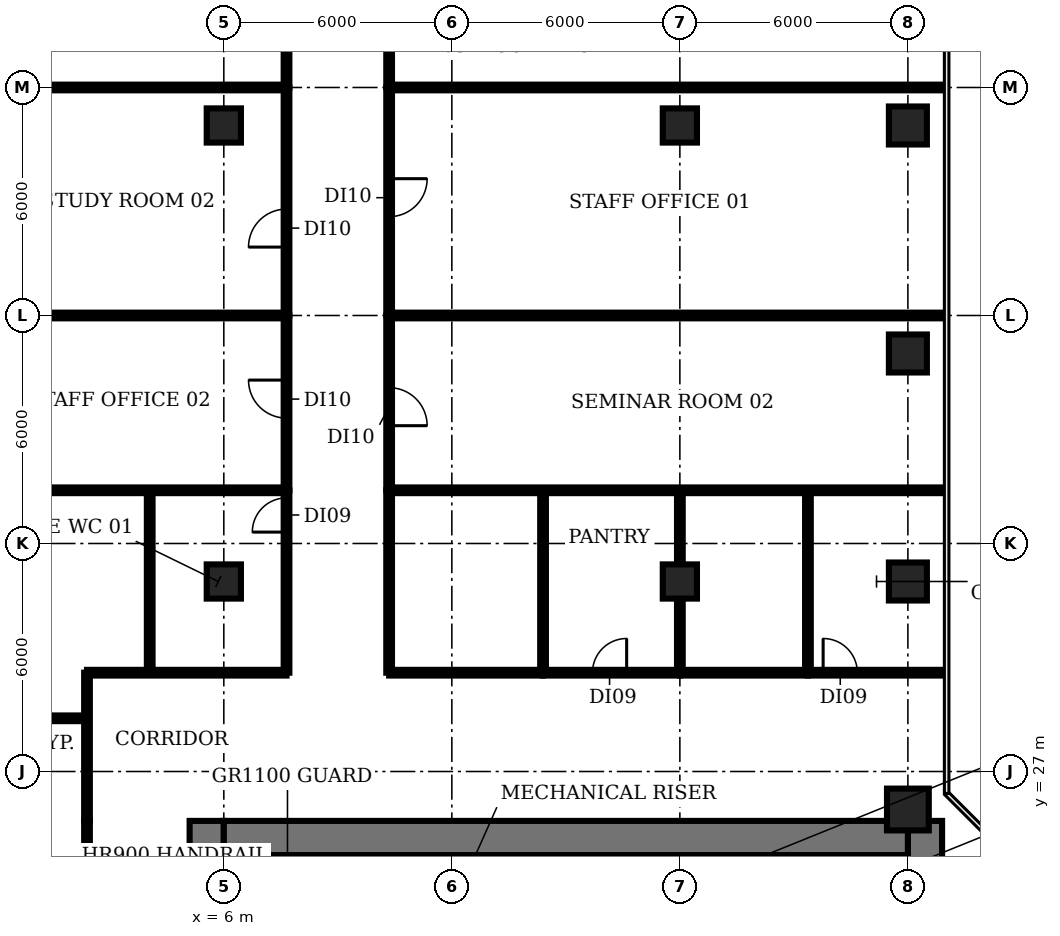
"""IFC4 building model, lengths in metres.
Left out: names, types, materials, properties, quantities, classifications, styles, units other than length and angle.
Written with IfcOpenShell. Run it as: python <this file> out.ifc"""

import sys

from ifc_helpers import new_model, si_unit, direction, frame, frame_2d, origin, origin_2d, place, context, subcontext, project, spatial, rectangle, circle, extrude, element, fill, save


model = new_model("IFC4")
c1 = context("Model", 3, precision=1e-05, world=origin(), true_north=direction((0.0, 1.0)))
c2 = subcontext(c1, "Body", "Model", "MODEL_VIEW")
j1 = project(units=[si_unit("LENGTHUNIT", "METRE"), si_unit("PLANEANGLEUNIT", "RADIAN")], contexts=[c1])
p1 = place(None, origin())
s1 = spatial("IfcSite", under=j1, at=p1, CompositionType="ELEMENT")
p2 = place(p1, origin())
s2 = spatial("IfcBuilding", under=s1, at=p2, CompositionType="ELEMENT")
p3 = place(p2, frame((0.0, 0.0, 11.0)))
s3 = spatial("IfcBuildingStorey", under=s2, at=p3, CompositionType="ELEMENT", Elevation=11.0)
for number, where, z_axis, x_axis in (
    (1, (6.0, 32.0, 0.0), (0.0, 0.0, 1.0), (1.0, 0.0, 0.0)),
    (2, (6.0, 44.0, 0.0), (0.0, 0.0, 1.0), (1.0, 0.0, 0.0)),
    (3, (18.0, 32.0, 0.0), (0.0, 0.0, 1.0), (1.0, 0.0, 0.0)),
    (4, (18.0, 44.0, 0.0), (0.0, 0.0, 1.0), (1.0, 0.0, 0.0)),
):
    element("IfcColumn", number, at=place(p3, frame(where, z_axis=z_axis, x_axis=x_axis)), inside=s3, PredefinedType="COLUMN", context=c2, shape_type="SweptSolid", body=[
        extrude(rectangle(XDim=0.9, YDim=0.9, at=origin_2d()), origin(), (0.0, 0.0, 1.0), 4.15),
    ])
p4 = place(p3, frame((24.0, 26.0, 0.0), z_axis=(0.0, 0.0, 1.0), x_axis=(1.0, 0.0, 0.0)))
e5 = element("IfcColumn", 5, at=p4, inside=s3, PredefinedType="COLUMN", context=c2, shape_type="SweptSolid", body=[
    extrude(circle(Radius=0.55, at=origin_2d()), origin(), (0.0, 0.0, 1.0), 4.15),
])
for number, where, z_axis, x_axis in (
    (6, (24.0, 32.0, 0.0), (0.0, 0.0, 1.0), (1.0, 0.0, 0.0)),
    (7, (24.0, 38.0, 0.0), (0.0, 0.0, 1.0), (1.0, 0.0, 0.0)),
    (8, (24.0, 44.0, 0.0), (0.0, 0.0, 1.0), (1.0, 0.0, 0.0)),
):
    element("IfcColumn", number, at=place(p3, frame(where, z_axis=z_axis, x_axis=x_axis)), inside=s3, PredefinedType="COLUMN", context=c2, shape_type="SweptSolid", body=[
        extrude(rectangle(XDim=1.0, YDim=1.0, at=origin_2d()), origin(), (0.0, 0.0, 1.0), 4.15),
    ])
p5 = place(p3, frame((9.275, 18.375, 0.0), z_axis=(0.0, 0.0, 1.0), x_axis=(0.0, 1.0, 0.0)))
e9 = element("IfcWall", 9, at=p5, inside=s3, PredefinedType="SHEAR", context=c2, shape_type="SweptSolid", body=[
    extrude(rectangle(XDim=6.425, YDim=0.25, at=frame_2d((3.212, 0.0))), origin(), (0.0, 0.0, 1.0), 4.15),
])
for number, where, z_axis, x_axis in (
    (10, (15.1, 22.9, 0.0), (0.0, 0.0, 1.0), (0.0, 1.0, 0.0)),
    (11, (20.7, 22.9, 0.0), (0.0, 0.0, 1.0), (0.0, 1.0, 0.0)),
):
    element("IfcWall", number, at=place(p3, frame(where, z_axis=z_axis, x_axis=x_axis)), inside=s3, PredefinedType="SHEAR", context=c2, shape_type="SweptSolid", body=[
        extrude(rectangle(XDim=1.9, YDim=0.2, at=frame_2d((0.95, 0.0))), origin(), (0.0, 0.0, 1.0), 4.15),
    ])
p6 = place(p3, frame((5.55, 4.5, 0.0), z_axis=(0.0, 0.0, 1.0), x_axis=(0.0, 1.0, 0.0)))
e12 = element("IfcWall", 12, at=p6, inside=s3, PredefinedType="SHEAR", context=c2, shape_type="SweptSolid", body=[
    extrude(rectangle(XDim=21.2, YDim=0.9, at=frame_2d((10.6, 0.0))), origin(), (0.0, 0.0, 1.0), 4.15),
])
p7 = place(p6, frame((7.6, 0.0, 0.0)))
e13 = element("IfcOpeningElement", 13, at=p7, cuts=e12, PredefinedType="OPENING", context=c2, shape_type="SweptSolid", body=[
    extrude(rectangle(XDim=1.2, YDim=2.1, at=frame_2d((0.6, 1.05))), frame((0.0, 0.46, 0.0), z_axis=(0.0, -1.0, 0.0), x_axis=(1.0, 0.0, 0.0)), (0.0, 0.0, 1.0), 0.92),
])
p8 = place(p6, frame((14.15, 0.0, 0.0)))
e14 = element("IfcOpeningElement", 14, at=p8, cuts=e12, PredefinedType="OPENING", context=c2, shape_type="SweptSolid", body=[
    extrude(rectangle(XDim=1.2, YDim=2.1, at=frame_2d((0.6, 1.05))), frame((0.0, 0.46, 0.0), z_axis=(0.0, -1.0, 0.0), x_axis=(1.0, 0.0, 0.0)), (0.0, 0.0, 1.0), 0.92),
])
p9 = place(p3, frame((24.45, 25.7, 0.0), z_axis=(0.0, 0.0, 1.0), x_axis=(0.0, -1.0, 0.0)))
e15 = element("IfcWall", 15, at=p9, inside=s3, PredefinedType="SHEAR", context=c2, shape_type="SweptSolid", body=[
    extrude(rectangle(XDim=21.2, YDim=0.9, at=frame_2d((10.6, 0.0))), origin(), (0.0, 0.0, 1.0), 4.15),
])
p10 = place(p9, frame((12.45, 0.0, 0.0)))
e16 = element("IfcOpeningElement", 16, at=p10, cuts=e15, PredefinedType="OPENING", context=c2, shape_type="SweptSolid", body=[
    extrude(rectangle(XDim=0.9, YDim=2.1, at=frame_2d((0.45, 1.05))), frame((0.0, 0.46, 0.0), z_axis=(0.0, -1.0, 0.0), x_axis=(1.0, 0.0, 0.0)), (0.0, 0.0, 1.0), 0.92),
])
p11 = place(p9, frame((6.45, 0.0, 0.0)))
e17 = element("IfcOpeningElement", 17, at=p11, cuts=e15, PredefinedType="OPENING", context=c2, shape_type="SweptSolid", body=[
    extrude(rectangle(XDim=2.0, YDim=2.1, at=frame_2d((1.0, 1.05))), frame((0.0, 0.46, 0.0), z_axis=(0.0, -1.0, 0.0), x_axis=(1.0, 0.0, 0.0)), (0.0, 0.0, 1.0), 0.92),
])
p12 = place(p3, frame((6.0, 25.25, 0.0), z_axis=(0.0, 0.0, 1.0), x_axis=(1.0, 0.0, 0.0)))
e18 = element("IfcWall", 18, at=p12, inside=s3, PredefinedType="SHEAR", context=c2, shape_type="SweptSolid", body=[
    extrude(rectangle(XDim=18.0, YDim=0.9, at=frame_2d((9.0, 0.0))), origin(), (0.0, 0.0, 1.0), 4.15),
])
p13 = place(p3, frame((-0.97, 28.4, 0.0), z_axis=(0.0, 0.0, 1.0), x_axis=(1.0, 0.0, 0.0)))
e19 = element("IfcWall", 19, at=p13, inside=s3, PredefinedType="PARTITIONING", context=c2, shape_type="SweptSolid", body=[
    extrude(rectangle(XDim=3.37, YDim=0.15, at=frame_2d((1.685, 0.0))), origin(), (0.0, 0.0, 1.0), 3.08),
])
for number, where, z_axis, x_axis in (
    (20, (-0.97, 34.4, 0.0), (0.0, 0.0, 1.0), (1.0, 0.0, 0.0)),
    (21, (-0.97, 39.0, 0.0), (0.0, 0.0, 1.0), (1.0, 0.0, 0.0)),
    (22, (-0.97, 45.0, 0.0), (0.0, 0.0, 1.0), (1.0, 0.0, 0.0)),
):
    element("IfcWall", number, at=place(p3, frame(where, z_axis=z_axis, x_axis=x_axis)), inside=s3, PredefinedType="PARTITIONING", context=c2, shape_type="SweptSolid", body=[
        extrude(rectangle(XDim=8.62, YDim=0.15, at=frame_2d((4.31, 0.0))), origin(), (0.0, 0.0, 1.0), 3.08),
    ])
p14 = place(p3, frame((2.4, 4.5, 0.0), z_axis=(0.0, 0.0, 1.0), x_axis=(0.0, 1.0, 0.0)))
e23 = element("IfcWall", 23, at=p14, inside=s3, PredefinedType="PARTITIONING", context=c2, shape_type="SweptSolid", body=[
    extrude(rectangle(XDim=21.2, YDim=0.15, at=frame_2d((10.6, 0.0))), origin(), (0.0, 0.0, 1.0), 3.08),
])
p15 = place(p14, frame((10.8, 0.0, 0.0)))
e24 = element("IfcOpeningElement", 24, at=p15, cuts=e23, PredefinedType="OPENING", context=c2, shape_type="SweptSolid", body=[
    extrude(rectangle(XDim=1.2, YDim=2.1, at=frame_2d((0.6, 1.05))), frame((0.0, 0.085, 0.0), z_axis=(0.0, -1.0, 0.0), x_axis=(1.0, 0.0, 0.0)), (0.0, 0.0, 1.0), 0.17),
])
p16 = place(p3, frame((2.4, 25.7, 0.0), z_axis=(0.0, 0.0, 1.0), x_axis=(0.0, 1.0, 0.0)))
e25 = element("IfcWall", 25, at=p16, inside=s3, PredefinedType="PARTITIONING", context=c2, shape_type="SweptSolid", body=[
    extrude(rectangle(XDim=3.9, YDim=0.15, at=frame_2d((1.95, 0.0))), origin(), (0.0, 0.0, 1.0), 3.08),
])
p17 = place(p3, frame((2.4, 29.6, 0.0), z_axis=(0.0, 0.0, 1.0), x_axis=(1.0, 0.0, 0.0)))
e26 = element("IfcWall", 26, at=p17, inside=s3, PredefinedType="PARTITIONING", context=c2, shape_type="SweptSolid", body=[
    extrude(rectangle(XDim=5.25, YDim=0.15, at=frame_2d((2.625, 0.0))), origin(), (0.0, 0.0, 1.0), 3.08),
])
p18 = place(p3, frame((4.05, 29.6, 0.0), z_axis=(0.0, 0.0, 1.0), x_axis=(0.0, 1.0, 0.0)))
e27 = element("IfcWall", 27, at=p18, inside=s3, PredefinedType="PARTITIONING", context=c2, shape_type="SweptSolid", body=[
    extrude(rectangle(XDim=4.8, YDim=0.15, at=frame_2d((2.4, 0.0))), origin(), (0.0, 0.0, 1.0), 3.08),
])
p19 = place(p3, frame((7.65, 29.6, 0.0), z_axis=(0.0, 0.0, 1.0), x_axis=(0.0, 1.0, 0.0)))
e28 = element("IfcWall", 28, at=p19, inside=s3, PredefinedType="PARTITIONING", context=c2, shape_type="SweptSolid", body=[
    extrude(rectangle(XDim=4.8, YDim=0.15, at=frame_2d((2.4, 0.0))), origin(), (0.0, 0.0, 1.0), 3.08),
])
p20 = place(p19, frame((3.7, 0.0, 0.0)))
e29 = element("IfcOpeningElement", 29, at=p20, cuts=e28, PredefinedType="OPENING", context=c2, shape_type="SweptSolid", body=[
    extrude(rectangle(XDim=0.9, YDim=2.1, at=frame_2d((0.45, 1.05))), frame((0.0, 0.085, 0.0), z_axis=(0.0, -1.0, 0.0), x_axis=(1.0, 0.0, 0.0)), (0.0, 0.0, 1.0), 0.17),
])
p21 = place(p3, frame((7.65, 34.4, 0.0), z_axis=(0.0, 0.0, 1.0), x_axis=(0.0, 1.0, 0.0)))
e30 = element("IfcWall", 30, at=p21, inside=s3, PredefinedType="PARTITIONING", context=c2, shape_type="SweptSolid", body=[
    extrude(rectangle(XDim=4.6, YDim=0.15, at=frame_2d((2.3, 0.0))), origin(), (0.0, 0.0, 1.0), 3.08),
])
p22 = place(p21, frame((1.9, 0.0, 0.0)))
e31 = element("IfcOpeningElement", 31, at=p22, cuts=e30, PredefinedType="OPENING", context=c2, shape_type="SweptSolid", body=[
    extrude(rectangle(XDim=1.0, YDim=2.1, at=frame_2d((0.5, 1.05))), frame((0.0, 0.085, 0.0), z_axis=(0.0, -1.0, 0.0), x_axis=(1.0, 0.0, 0.0)), (0.0, 0.0, 1.0), 0.17),
])
p23 = place(p3, frame((7.65, 39.0, 0.0), z_axis=(0.0, 0.0, 1.0), x_axis=(0.0, 1.0, 0.0)))
e32 = element("IfcWall", 32, at=p23, inside=s3, PredefinedType="PARTITIONING", context=c2, shape_type="SweptSolid", body=[
    extrude(rectangle(XDim=6.0, YDim=0.15, at=frame_2d((3.0, 0.0))), origin(), (0.0, 0.0, 1.0), 3.08),
])
p24 = place(p23, frame((1.8, 0.0, 0.0)))
e33 = element("IfcOpeningElement", 33, at=p24, cuts=e32, PredefinedType="OPENING", context=c2, shape_type="SweptSolid", body=[
    extrude(rectangle(XDim=1.0, YDim=2.1, at=frame_2d((0.5, 1.05))), frame((0.0, 0.085, 0.0), z_axis=(0.0, -1.0, 0.0), x_axis=(1.0, 0.0, 0.0)), (0.0, 0.0, 1.0), 0.17),
])
p25 = place(p3, frame((7.65, 45.0, 0.0), z_axis=(0.0, 0.0, 1.0), x_axis=(0.0, 1.0, 0.0)))
e34 = element("IfcWall", 34, at=p25, inside=s3, PredefinedType="PARTITIONING", context=c2, shape_type="SweptSolid", body=[
    extrude(rectangle(XDim=12.0, YDim=0.15, at=frame_2d((6.0, 0.0))), origin(), (0.0, 0.0, 1.0), 3.08),
])
p26 = place(p25, frame((5.4, 0.0, 0.0)))
e35 = element("IfcOpeningElement", 35, at=p26, cuts=e34, PredefinedType="OPENING", context=c2, shape_type="SweptSolid", body=[
    extrude(rectangle(XDim=1.0, YDim=2.1, at=frame_2d((0.5, 1.05))), frame((0.0, 0.085, 0.0), z_axis=(0.0, -1.0, 0.0), x_axis=(1.0, 0.0, 0.0)), (0.0, 0.0, 1.0), 0.17),
])
p27 = place(p3, frame((10.35, 29.6, 0.0), z_axis=(0.0, 0.0, 1.0), x_axis=(0.0, 1.0, 0.0)))
e36 = element("IfcWall", 36, at=p27, inside=s3, PredefinedType="PARTITIONING", context=c2, shape_type="SweptSolid", body=[
    extrude(rectangle(XDim=4.8, YDim=0.15, at=frame_2d((2.4, 0.0))), origin(), (0.0, 0.0, 1.0), 3.08),
])
p28 = place(p3, frame((10.35, 29.6, 0.0), z_axis=(0.0, 0.0, 1.0), x_axis=(1.0, 0.0, 0.0)))
e37 = element("IfcWall", 37, at=p28, inside=s3, PredefinedType="PARTITIONING", context=c2, shape_type="SweptSolid", body=[
    extrude(rectangle(XDim=4.05, YDim=0.15, at=frame_2d((2.025, 0.0))), origin(), (0.0, 0.0, 1.0), 3.08),
])
p29 = place(p3, frame((10.35, 34.4, 0.0), z_axis=(0.0, 0.0, 1.0), x_axis=(1.0, 0.0, 0.0)))
e38 = element("IfcWall", 38, at=p29, inside=s3, PredefinedType="PARTITIONING", context=c2, shape_type="SweptSolid", body=[
    extrude(rectangle(XDim=14.62, YDim=0.15, at=frame_2d((7.31, 0.0))), origin(), (0.0, 0.0, 1.0), 3.08),
])
p30 = place(p3, frame((10.35, 39.0, 0.0), z_axis=(0.0, 0.0, 1.0), x_axis=(0.0, -1.0, 0.0)))
e39 = element("IfcWall", 39, at=p30, inside=s3, PredefinedType="PARTITIONING", context=c2, shape_type="SweptSolid", body=[
    extrude(rectangle(XDim=4.6, YDim=0.15, at=frame_2d((2.3, 0.0))), origin(), (0.0, 0.0, 1.0), 3.08),
])
p31 = place(p30, frame((1.9, 0.0, 0.0)))
e40 = element("IfcOpeningElement", 40, at=p31, cuts=e39, PredefinedType="OPENING", context=c2, shape_type="SweptSolid", body=[
    extrude(rectangle(XDim=1.0, YDim=2.1, at=frame_2d((0.5, 1.05))), frame((0.0, 0.085, 0.0), z_axis=(0.0, -1.0, 0.0), x_axis=(1.0, 0.0, 0.0)), (0.0, 0.0, 1.0), 0.17),
])
p32 = place(p3, frame((10.35, 39.0, 0.0), z_axis=(0.0, 0.0, 1.0), x_axis=(1.0, 0.0, 0.0)))
e41 = element("IfcWall", 41, at=p32, inside=s3, PredefinedType="PARTITIONING", context=c2, shape_type="SweptSolid", body=[
    extrude(rectangle(XDim=14.62, YDim=0.15, at=frame_2d((7.31, 0.0))), origin(), (0.0, 0.0, 1.0), 3.08),
])
p33 = place(p3, frame((10.35, 45.0, 0.0), z_axis=(0.0, 0.0, 1.0), x_axis=(0.0, -1.0, 0.0)))
e42 = element("IfcWall", 42, at=p33, inside=s3, PredefinedType="PARTITIONING", context=c2, shape_type="SweptSolid", body=[
    extrude(rectangle(XDim=6.0, YDim=0.15, at=frame_2d((3.0, 0.0))), origin(), (0.0, 0.0, 1.0), 3.08),
])
p34 = place(p33, frame((2.4, 0.0, 0.0)))
e43 = element("IfcOpeningElement", 43, at=p34, cuts=e42, PredefinedType="OPENING", context=c2, shape_type="SweptSolid", body=[
    extrude(rectangle(XDim=1.0, YDim=2.1, at=frame_2d((0.5, 1.05))), frame((0.0, 0.085, 0.0), z_axis=(0.0, -1.0, 0.0), x_axis=(1.0, 0.0, 0.0)), (0.0, 0.0, 1.0), 0.17),
])
p35 = place(p3, frame((10.35, 45.0, 0.0), z_axis=(0.0, 0.0, 1.0), x_axis=(1.0, 0.0, 0.0)))
e44 = element("IfcWall", 44, at=p35, inside=s3, PredefinedType="PARTITIONING", context=c2, shape_type="SweptSolid", body=[
    extrude(rectangle(XDim=14.62, YDim=0.15, at=frame_2d((7.31, 0.0))), origin(), (0.0, 0.0, 1.0), 3.08),
])
p36 = place(p3, frame((10.35, 57.0, 0.0), z_axis=(0.0, 0.0, 1.0), x_axis=(0.0, -1.0, 0.0)))
e45 = element("IfcWall", 45, at=p36, inside=s3, PredefinedType="PARTITIONING", context=c2, shape_type="SweptSolid", body=[
    extrude(rectangle(XDim=12.0, YDim=0.15, at=frame_2d((6.0, 0.0))), origin(), (0.0, 0.0, 1.0), 3.08),
])
p37 = place(p36, frame((5.4, 0.0, 0.0)))
e46 = element("IfcOpeningElement", 46, at=p37, cuts=e45, PredefinedType="OPENING", context=c2, shape_type="SweptSolid", body=[
    extrude(rectangle(XDim=1.0, YDim=2.1, at=frame_2d((0.5, 1.05))), frame((0.0, 0.085, 0.0), z_axis=(0.0, -1.0, 0.0), x_axis=(1.0, 0.0, 0.0)), (0.0, 0.0, 1.0), 0.17),
])
p38 = place(p3, frame((14.4, 29.6, 0.0), z_axis=(0.0, 0.0, 1.0), x_axis=(0.0, 1.0, 0.0)))
e47 = element("IfcWall", 47, at=p38, inside=s3, PredefinedType="PARTITIONING", context=c2, shape_type="SweptSolid", body=[
    extrude(rectangle(XDim=4.8, YDim=0.15, at=frame_2d((2.4, 0.0))), origin(), (0.0, 0.0, 1.0), 3.08),
])
p39 = place(p3, frame((14.4, 29.6, 0.0), z_axis=(0.0, 0.0, 1.0), x_axis=(1.0, 0.0, 0.0)))
e48 = element("IfcWall", 48, at=p39, inside=s3, PredefinedType="PARTITIONING", context=c2, shape_type="SweptSolid", body=[
    extrude(rectangle(XDim=3.6, YDim=0.15, at=frame_2d((1.8, 0.0))), origin(), (0.0, 0.0, 1.0), 3.08),
])
p40 = place(p39, frame((1.3, 0.0, 0.0)))
e49 = element("IfcOpeningElement", 49, at=p40, cuts=e48, PredefinedType="OPENING", context=c2, shape_type="SweptSolid", body=[
    extrude(rectangle(XDim=0.9, YDim=2.1, at=frame_2d((0.45, 1.05))), frame((0.0, 0.085, 0.0), z_axis=(0.0, -1.0, 0.0), x_axis=(1.0, 0.0, 0.0)), (0.0, 0.0, 1.0), 0.17),
])
p41 = place(p3, frame((18.0, 29.6, 0.0), z_axis=(0.0, 0.0, 1.0), x_axis=(0.0, 1.0, 0.0)))
e50 = element("IfcWall", 50, at=p41, inside=s3, PredefinedType="PARTITIONING", context=c2, shape_type="SweptSolid", body=[
    extrude(rectangle(XDim=4.8, YDim=0.15, at=frame_2d((2.4, 0.0))), origin(), (0.0, 0.0, 1.0), 3.08),
])
p42 = place(p3, frame((18.0, 29.6, 0.0), z_axis=(0.0, 0.0, 1.0), x_axis=(1.0, 0.0, 0.0)))
e51 = element("IfcWall", 51, at=p42, inside=s3, PredefinedType="PARTITIONING", context=c2, shape_type="SweptSolid", body=[
    extrude(rectangle(XDim=3.37, YDim=0.15, at=frame_2d((1.685, 0.0))), origin(), (0.0, 0.0, 1.0), 3.08),
])
p43 = place(p3, frame((21.37, 29.6, 0.0), z_axis=(0.0, 0.0, 1.0), x_axis=(0.0, 1.0, 0.0)))
e52 = element("IfcWall", 52, at=p43, inside=s3, PredefinedType="PARTITIONING", context=c2, shape_type="SweptSolid", body=[
    extrude(rectangle(XDim=4.8, YDim=0.15, at=frame_2d((2.4, 0.0))), origin(), (0.0, 0.0, 1.0), 3.08),
])
p44 = place(p3, frame((21.37, 29.6, 0.0), z_axis=(0.0, 0.0, 1.0), x_axis=(1.0, 0.0, 0.0)))
e53 = element("IfcWall", 53, at=p44, inside=s3, PredefinedType="PARTITIONING", context=c2, shape_type="SweptSolid", body=[
    extrude(rectangle(XDim=3.6, YDim=0.15, at=frame_2d((1.8, 0.0))), origin(), (0.0, 0.0, 1.0), 3.08),
])
p45 = place(p44, frame((0.4, 0.0, 0.0)))
e54 = element("IfcOpeningElement", 54, at=p45, cuts=e53, PredefinedType="OPENING", context=c2, shape_type="SweptSolid", body=[
    extrude(rectangle(XDim=0.9, YDim=2.1, at=frame_2d((0.45, 1.05))), frame((0.0, 0.085, 0.0), z_axis=(0.0, -1.0, 0.0), x_axis=(1.0, 0.0, 0.0)), (0.0, 0.0, 1.0), 0.17),
])
p46 = place(p20, origin())
e55 = element("IfcDoor", 55, at=p46, inside=s3, OperationType="SINGLE_SWING_LEFT", PredefinedType="DOOR", context=c2, shape_type="SweptSolid", body=[
    extrude(rectangle(XDim=0.9, YDim=2.1, at=frame_2d((0.45, 1.05))), frame((0.0, 0.025, 0.0), z_axis=(0.0, -1.0, 0.0), x_axis=(1.0, 0.0, 0.0)), (0.0, 0.0, 1.0), 0.05),
])
fill(e29, e55)
p47 = place(p22, origin())
e56 = element("IfcDoor", 56, at=p47, inside=s3, OperationType="SINGLE_SWING_RIGHT", PredefinedType="DOOR", context=c2, shape_type="SweptSolid", body=[
    extrude(rectangle(XDim=1.0, YDim=2.1, at=frame_2d((0.5, 1.05))), frame((0.0, 0.025, 0.0), z_axis=(0.0, -1.0, 0.0), x_axis=(1.0, 0.0, 0.0)), (0.0, 0.0, 1.0), 0.05),
])
fill(e31, e56)
p48 = place(p24, origin())
e57 = element("IfcDoor", 57, at=p48, inside=s3, OperationType="SINGLE_SWING_LEFT", PredefinedType="DOOR", context=c2, shape_type="SweptSolid", body=[
    extrude(rectangle(XDim=1.0, YDim=2.1, at=frame_2d((0.5, 1.05))), frame((0.0, 0.025, 0.0), z_axis=(0.0, -1.0, 0.0), x_axis=(1.0, 0.0, 0.0)), (0.0, 0.0, 1.0), 0.05),
])
fill(e33, e57)
p49 = place(p31, origin())
e58 = element("IfcDoor", 58, at=p49, inside=s3, OperationType="SINGLE_SWING_RIGHT", PredefinedType="DOOR", context=c2, shape_type="SweptSolid", body=[
    extrude(rectangle(XDim=1.0, YDim=2.1, at=frame_2d((0.5, 1.05))), frame((0.0, 0.025, 0.0), z_axis=(0.0, -1.0, 0.0), x_axis=(1.0, 0.0, 0.0)), (0.0, 0.0, 1.0), 0.05),
])
fill(e40, e58)
p50 = place(p34, origin())
e59 = element("IfcDoor", 59, at=p50, inside=s3, OperationType="SINGLE_SWING_LEFT", PredefinedType="DOOR", context=c2, shape_type="SweptSolid", body=[
    extrude(rectangle(XDim=1.0, YDim=2.1, at=frame_2d((0.5, 1.05))), frame((0.0, 0.025, 0.0), z_axis=(0.0, -1.0, 0.0), x_axis=(1.0, 0.0, 0.0)), (0.0, 0.0, 1.0), 0.05),
])
fill(e43, e59)
p51 = place(p40, origin())
e60 = element("IfcDoor", 60, at=p51, inside=s3, OperationType="SINGLE_SWING_RIGHT", PredefinedType="DOOR", context=c2, shape_type="SweptSolid", body=[
    extrude(rectangle(XDim=0.9, YDim=2.1, at=frame_2d((0.45, 1.05))), frame((0.0, 0.025, 0.0), z_axis=(0.0, -1.0, 0.0), x_axis=(1.0, 0.0, 0.0)), (0.0, 0.0, 1.0), 0.05),
])
fill(e49, e60)
p52 = place(p45, origin())
e61 = element("IfcDoor", 61, at=p52, inside=s3, OperationType="SINGLE_SWING_LEFT", PredefinedType="DOOR", context=c2, shape_type="SweptSolid", body=[
    extrude(rectangle(XDim=0.9, YDim=2.1, at=frame_2d((0.45, 1.05))), frame((0.0, 0.025, 0.0), z_axis=(0.0, -1.0, 0.0), x_axis=(1.0, 0.0, 0.0)), (0.0, 0.0, 1.0), 0.05),
])
fill(e54, e61)
save(model, sys.argv[1])
